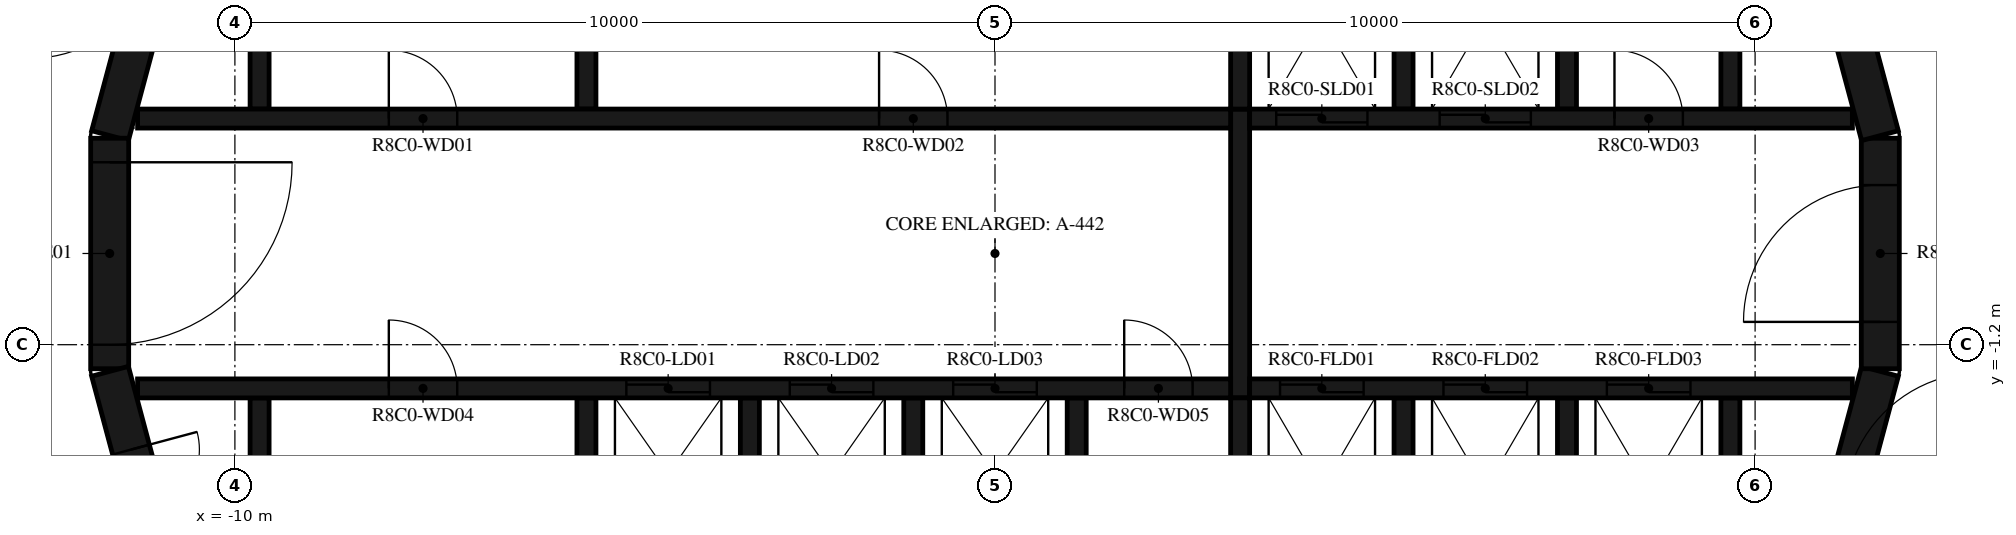
"""IFC4 building model, lengths in metres.
Left out: names, types, materials, properties, quantities, classifications, styles, units other than length and angle.
Written with IfcOpenShell. Run it as: python <this file> out.ifc"""

import sys

from ifc_helpers import new_model, si_unit, direction, frame, frame_2d, origin, place, context, subcontext, project, spatial, polyline, rectangle, outline, extrude, element, fill, save


model = new_model("IFC4")
c1 = context("Model", 3, precision=1e-05, world=origin(), true_north=direction((0.0, 1.0)))
c2 = subcontext(c1, "Body", "Model", "MODEL_VIEW")
j1 = project(units=[si_unit("LENGTHUNIT", "METRE"), si_unit("PLANEANGLEUNIT", "RADIAN")], contexts=[c1])
p1 = place(None, origin())
s1 = spatial("IfcSite", under=j1, at=p1, CompositionType="ELEMENT")
p2 = place(p1, origin())
s2 = spatial("IfcBuilding", under=s1, at=p2, CompositionType="ELEMENT")
p3 = place(p2, frame((0.0, 0.0, 319.2)))
s3 = spatial("IfcBuildingStorey", under=s2, at=p3, CompositionType="ELEMENT", Elevation=319.2)
p4 = place(p3, frame((10.858, -4.479, 0.0), z_axis=(0.0, 0.0, 1.0), x_axis=(0.258734743916, 0.965948410781, 0.0)))
e1 = element("IfcWall", 1, at=p4, inside=s3, PredefinedType="SHEAR", context=c2, shape_type="SweptSolid", body=[
    extrude(rectangle(XDim=3.033, YDim=0.5, at=frame_2d((1.516, 0.0))), origin(), (0.0, 0.0, 1.0), 3.12),
])
p5 = place(p3, frame((11.647, -1.516, 0.0), z_axis=(0.0, 0.0, 1.0), x_axis=(0.0, 1.0, 0.0)))
e2 = element("IfcWall", 2, at=p5, inside=s3, PredefinedType="SHEAR", context=c2, shape_type="SweptSolid", body=[
    extrude(rectangle(XDim=3.033, YDim=0.5, at=frame_2d((1.516, 0.0))), origin(), (0.0, 0.0, 1.0), 3.12),
])
p6 = place(p5, frame((0.616, 0.0, 0.0)))
e3 = element("IfcOpeningElement", 3, at=p6, cuts=e2, PredefinedType="OPENING", context=c2, shape_type="SweptSolid", body=[
    extrude(rectangle(XDim=1.8, YDim=2.1, at=frame_2d((0.9, 1.05))), frame((0.0, 0.26, 0.0), z_axis=(0.0, -1.0, 0.0), x_axis=(1.0, 0.0, 0.0)), (0.0, 0.0, 1.0), 0.52),
])
for number, where, z_axis, x_axis in (
    (4, (11.643, 1.55, 0.0), (0.0, 0.0, 1.0), (-0.259, 0.966, 0.0)),
    (5, (-10.858, 4.479, 0.0), (0.0, 0.0, 1.0), (-0.259, -0.966, 0.0)),
):
    element("IfcWall", number, at=place(p3, frame(where, z_axis=z_axis, x_axis=x_axis)), inside=s3, PredefinedType="SHEAR", context=c2, shape_type="SweptSolid", body=[
        extrude(rectangle(XDim=3.033, YDim=0.5, at=frame_2d((1.516, 0.0))), origin(), (0.0, 0.0, 1.0), 3.12),
    ])
p7 = place(p3, frame((-11.647, 1.516, 0.0), z_axis=(0.0, 0.0, 1.0), x_axis=(0.0, -1.0, 0.0)))
e6 = element("IfcWall", 6, at=p7, inside=s3, PredefinedType="SHEAR", context=c2, shape_type="SweptSolid", body=[
    extrude(rectangle(XDim=3.033, YDim=0.5, at=frame_2d((1.516, 0.0))), origin(), (0.0, 0.0, 1.0), 3.12),
])
p8 = place(p7, frame((0.316, 0.0, 0.0)))
e7 = element("IfcOpeningElement", 7, at=p8, cuts=e6, PredefinedType="OPENING", context=c2, shape_type="SweptSolid", body=[
    extrude(rectangle(XDim=2.4, YDim=2.1, at=frame_2d((1.2, 1.05))), frame((0.0, 0.26, 0.0), z_axis=(0.0, -1.0, 0.0), x_axis=(1.0, 0.0, 0.0)), (0.0, 0.0, 1.0), 0.52),
])
p9 = place(p3, frame((-11.643, -1.55, 0.0), z_axis=(0.0, 0.0, 1.0), x_axis=(0.258734743916, -0.965948410781, 0.0)))
e8 = element("IfcWall", 8, at=p9, inside=s3, PredefinedType="SHEAR", context=c2, shape_type="SweptSolid", body=[
    extrude(rectangle(XDim=3.033, YDim=0.5, at=frame_2d((1.516, 0.0))), origin(), (0.0, 0.0, 1.0), 3.12),
])
p10 = place(p9, frame((1.066, 0.0, 0.0)))
e9 = element("IfcOpeningElement", 9, at=p10, cuts=e8, PredefinedType="OPENING", context=c2, shape_type="SweptSolid", body=[
    extrude(rectangle(XDim=0.9, YDim=2.1, at=frame_2d((0.45, 1.05))), frame((0.0, 0.26, 0.0), z_axis=(0.0, -1.0, 0.0), x_axis=(1.0, 0.0, 0.0)), (0.0, 0.0, 1.0), 0.52),
])
p11 = place(p3, origin())
e10 = element("IfcWall", 10, at=p11, inside=s3, PredefinedType="SHEAR", context=c2, shape_type="SweptSolid", body=[
    extrude(outline(polyline([(-9.8, 1.9), (-9.55, 1.9), (-9.55, 4.8), (-5.5, 4.8), (-5.5, 1.9), (-5.25, 1.9), (-5.25, 4.8), (3.1, 4.8), (3.1, 1.9), (3.35, 1.9), (3.35, 4.8), (5.25, 4.8), (5.25, 1.9), (5.5, 1.9), (5.5, 4.8), (7.4, 4.8), (7.4, 1.9), (7.65, 1.9), (7.65, 4.8), (9.55, 4.8), (9.55, 1.9), (9.8, 1.9), (9.8, 4.8), (9.8, 5.05), (-9.8, 5.05), (-9.8, 4.8), (-9.8, 1.9)])), origin(), (0.0, 0.0, 1.0), 3.12),
])
p12 = place(p3, origin())
e11 = element("IfcWall", 11, at=p12, inside=s3, PredefinedType="SHEAR", context=c2, shape_type="SweptSolid", body=[
    extrude(outline(polyline([(9.8, -5.05), (9.8, -4.8), (9.8, -1.9), (9.55, -1.9), (9.55, -4.8), (7.65, -4.8), (7.65, -1.9), (7.4, -1.9), (7.4, -4.8), (5.5, -4.8), (5.5, -1.9), (5.25, -1.9), (5.25, -4.8), (3.35, -4.8), (3.35, -1.9), (3.1, -1.9), (3.1, -4.8), (1.2, -4.8), (1.2, -1.9), (0.95, -1.9), (0.95, -4.8), (-0.95, -4.8), (-0.95, -1.9), (-1.2, -1.9), (-1.2, -4.8), (-3.1, -4.8), (-3.1, -1.9), (-3.35, -1.9), (-3.35, -4.8), (-5.25, -4.8), (-5.25, -1.9), (-5.5, -1.9), (-5.5, -4.8), (-9.55, -4.8), (-9.55, -1.9), (-9.8, -1.9), (-9.8, -4.8), (-9.8, -5.05), (9.8, -5.05)])), origin(), (0.0, 0.0, 1.0), 3.12),
])
p13 = place(p3, frame((-11.28, 1.775, 0.0), z_axis=(0.0, 0.0, 1.0), x_axis=(1.0, 0.0, 0.0)))
e12 = element("IfcWall", 12, at=p13, inside=s3, PredefinedType="SHEAR", context=c2, shape_type="SweptSolid", body=[
    extrude(rectangle(XDim=14.38, YDim=0.25, at=frame_2d((7.19, 0.0))), origin(), (0.0, 0.0, 1.0), 3.12),
])
p14 = place(p13, frame((3.305, 0.0, 0.0)))
e13 = element("IfcOpeningElement", 13, at=p14, cuts=e12, PredefinedType="OPENING", context=c2, shape_type="SweptSolid", body=[
    extrude(rectangle(XDim=0.9, YDim=2.1, at=frame_2d((0.45, 1.05))), frame((0.0, 0.135, 0.0), z_axis=(0.0, -1.0, 0.0), x_axis=(1.0, 0.0, 0.0)), (0.0, 0.0, 1.0), 0.27),
])
p15 = place(p13, frame((9.755, 0.0, 0.0)))
e14 = element("IfcOpeningElement", 14, at=p15, cuts=e12, PredefinedType="OPENING", context=c2, shape_type="SweptSolid", body=[
    extrude(rectangle(XDim=0.9, YDim=2.1, at=frame_2d((0.45, 1.05))), frame((0.0, 0.135, 0.0), z_axis=(0.0, -1.0, 0.0), x_axis=(1.0, 0.0, 0.0)), (0.0, 0.0, 1.0), 0.27),
])
p16 = place(p3, frame((3.35, 1.775, 0.0), z_axis=(0.0, 0.0, 1.0), x_axis=(1.0, 0.0, 0.0)))
e15 = element("IfcWall", 15, at=p16, inside=s3, PredefinedType="SHEAR", context=c2, shape_type="SweptSolid", body=[
    extrude(rectangle(XDim=7.93, YDim=0.25, at=frame_2d((3.965, 0.0))), origin(), (0.0, 0.0, 1.0), 3.12),
])
p17 = place(p16, frame((0.35, 0.0, 0.0)))
e16 = element("IfcOpeningElement", 16, at=p17, cuts=e15, PredefinedType="OPENING", context=c2, shape_type="SweptSolid", body=[
    extrude(rectangle(XDim=1.2, YDim=2.4, at=frame_2d((0.6, 1.2))), frame((0.0, 0.135, 0.0), z_axis=(0.0, -1.0, 0.0), x_axis=(1.0, 0.0, 0.0)), (0.0, 0.0, 1.0), 0.27),
])
p18 = place(p16, frame((2.5, 0.0, 0.0)))
e17 = element("IfcOpeningElement", 17, at=p18, cuts=e15, PredefinedType="OPENING", context=c2, shape_type="SweptSolid", body=[
    extrude(rectangle(XDim=1.2, YDim=2.4, at=frame_2d((0.6, 1.2))), frame((0.0, 0.135, 0.0), z_axis=(0.0, -1.0, 0.0), x_axis=(1.0, 0.0, 0.0)), (0.0, 0.0, 1.0), 0.27),
])
p19 = place(p16, frame((4.8, 0.0, 0.0)))
e18 = element("IfcOpeningElement", 18, at=p19, cuts=e15, PredefinedType="OPENING", context=c2, shape_type="SweptSolid", body=[
    extrude(rectangle(XDim=0.9, YDim=2.1, at=frame_2d((0.45, 1.05))), frame((0.0, 0.135, 0.0), z_axis=(0.0, -1.0, 0.0), x_axis=(1.0, 0.0, 0.0)), (0.0, 0.0, 1.0), 0.27),
])
p20 = place(p3, frame((-11.28, -1.775, 0.0), z_axis=(0.0, 0.0, 1.0), x_axis=(1.0, 0.0, 0.0)))
e19 = element("IfcWall", 19, at=p20, inside=s3, PredefinedType="SHEAR", context=c2, shape_type="SweptSolid", body=[
    extrude(rectangle(XDim=14.38, YDim=0.25, at=frame_2d((7.19, 0.0))), origin(), (0.0, 0.0, 1.0), 3.12),
])
p21 = place(p20, frame((6.43, 0.0, 0.0)))
e20 = element("IfcOpeningElement", 20, at=p21, cuts=e19, PredefinedType="OPENING", context=c2, shape_type="SweptSolid", body=[
    extrude(rectangle(XDim=1.1, YDim=2.1, at=frame_2d((0.55, 1.05))), frame((0.0, 0.135, 0.0), z_axis=(0.0, -1.0, 0.0), x_axis=(1.0, 0.0, 0.0)), (0.0, 0.0, 1.0), 0.27),
])
p22 = place(p20, frame((8.58, 0.0, 0.0)))
e21 = element("IfcOpeningElement", 21, at=p22, cuts=e19, PredefinedType="OPENING", context=c2, shape_type="SweptSolid", body=[
    extrude(rectangle(XDim=1.1, YDim=2.1, at=frame_2d((0.55, 1.05))), frame((0.0, 0.135, 0.0), z_axis=(0.0, -1.0, 0.0), x_axis=(1.0, 0.0, 0.0)), (0.0, 0.0, 1.0), 0.27),
])
p23 = place(p20, frame((10.73, 0.0, 0.0)))
e22 = element("IfcOpeningElement", 22, at=p23, cuts=e19, PredefinedType="OPENING", context=c2, shape_type="SweptSolid", body=[
    extrude(rectangle(XDim=1.1, YDim=2.1, at=frame_2d((0.55, 1.05))), frame((0.0, 0.135, 0.0), z_axis=(0.0, -1.0, 0.0), x_axis=(1.0, 0.0, 0.0)), (0.0, 0.0, 1.0), 0.27),
])
p24 = place(p20, frame((3.305, 0.0, 0.0)))
e23 = element("IfcOpeningElement", 23, at=p24, cuts=e19, PredefinedType="OPENING", context=c2, shape_type="SweptSolid", body=[
    extrude(rectangle(XDim=0.9, YDim=2.1, at=frame_2d((0.45, 1.05))), frame((0.0, 0.135, 0.0), z_axis=(0.0, -1.0, 0.0), x_axis=(1.0, 0.0, 0.0)), (0.0, 0.0, 1.0), 0.27),
])
p25 = place(p20, frame((12.98, 0.0, 0.0)))
e24 = element("IfcOpeningElement", 24, at=p25, cuts=e19, PredefinedType="OPENING", context=c2, shape_type="SweptSolid", body=[
    extrude(rectangle(XDim=0.9, YDim=2.1, at=frame_2d((0.45, 1.05))), frame((0.0, 0.135, 0.0), z_axis=(0.0, -1.0, 0.0), x_axis=(1.0, 0.0, 0.0)), (0.0, 0.0, 1.0), 0.27),
])
p26 = place(p3, frame((3.35, -1.775, 0.0), z_axis=(0.0, 0.0, 1.0), x_axis=(1.0, 0.0, 0.0)))
e25 = element("IfcWall", 25, at=p26, inside=s3, PredefinedType="SHEAR", context=c2, shape_type="SweptSolid", body=[
    extrude(rectangle(XDim=7.93, YDim=0.25, at=frame_2d((3.965, 0.0))), origin(), (0.0, 0.0, 1.0), 3.12),
])
p27 = place(p26, frame((0.4, 0.0, 0.0)))
e26 = element("IfcOpeningElement", 26, at=p27, cuts=e25, PredefinedType="OPENING", context=c2, shape_type="SweptSolid", body=[
    extrude(rectangle(XDim=1.1, YDim=2.4, at=frame_2d((0.55, 1.2))), frame((0.0, 0.135, 0.0), z_axis=(0.0, -1.0, 0.0), x_axis=(1.0, 0.0, 0.0)), (0.0, 0.0, 1.0), 0.27),
])
p28 = place(p26, frame((2.55, 0.0, 0.0)))
e27 = element("IfcOpeningElement", 27, at=p28, cuts=e25, PredefinedType="OPENING", context=c2, shape_type="SweptSolid", body=[
    extrude(rectangle(XDim=1.1, YDim=2.4, at=frame_2d((0.55, 1.2))), frame((0.0, 0.135, 0.0), z_axis=(0.0, -1.0, 0.0), x_axis=(1.0, 0.0, 0.0)), (0.0, 0.0, 1.0), 0.27),
])
p29 = place(p26, frame((4.7, 0.0, 0.0)))
e28 = element("IfcOpeningElement", 28, at=p29, cuts=e25, PredefinedType="OPENING", context=c2, shape_type="SweptSolid", body=[
    extrude(rectangle(XDim=1.1, YDim=2.4, at=frame_2d((0.55, 1.2))), frame((0.0, 0.135, 0.0), z_axis=(0.0, -1.0, 0.0), x_axis=(1.0, 0.0, 0.0)), (0.0, 0.0, 1.0), 0.27),
])
p30 = place(p3, frame((3.225, -1.9, 0.0), z_axis=(0.0, 0.0, 1.0), x_axis=(0.0, 1.0, 0.0)))
e29 = element("IfcWall", 29, at=p30, inside=s3, PredefinedType="SHEAR", context=c2, shape_type="SweptSolid", body=[
    extrude(rectangle(XDim=3.8, YDim=0.25, at=frame_2d((1.9, 0.0))), origin(), (0.0, 0.0, 1.0), 3.12),
])
p31 = place(p3, frame((12.074, -6.831, 0.0), z_axis=(0.0, 0.0, 1.0), x_axis=(0.250391063186, 0.968144780225, 0.0)))
e30 = element("IfcWall", 30, at=p31, inside=s3, PredefinedType="STANDARD", context=c2, shape_type="SweptSolid", body=[
    extrude(rectangle(XDim=7.181, YDim=0.2, at=frame_2d((3.591, 0.0))), origin(), (0.0, 0.0, 1.0), 3.12),
])
p32 = place(p31, frame((3.581, 0.0, 0.0)))
e31 = element("IfcOpeningElement", 31, at=p32, cuts=e30, PredefinedType="OPENING", context=c2, shape_type="SweptSolid", body=[
    extrude(rectangle(XDim=1.8, YDim=2.1, at=frame_2d((0.9, 1.05))), frame((0.0, 0.11, 0.0), z_axis=(0.0, -1.0, 0.0), x_axis=(1.0, 0.0, 0.0)), (0.0, 0.0, 1.0), 0.22),
])
p33 = place(p3, frame((-12.074, 6.831, 0.0), z_axis=(0.0, 0.0, 1.0), x_axis=(-0.250391063186, -0.968144780225, 0.0)))
e32 = element("IfcWall", 32, at=p33, inside=s3, PredefinedType="STANDARD", context=c2, shape_type="SweptSolid", body=[
    extrude(rectangle(XDim=7.181, YDim=0.2, at=frame_2d((3.591, 0.0))), origin(), (0.0, 0.0, 1.0), 3.12),
])
p34 = place(p33, frame((2.548, 0.0, 0.0)))
e33 = element("IfcOpeningElement", 33, at=p34, cuts=e32, PredefinedType="OPENING", context=c2, shape_type="SweptSolid", body=[
    extrude(rectangle(XDim=1.8, YDim=2.1, at=frame_2d((0.9, 1.05))), frame((0.0, 0.11, 0.0), z_axis=(0.0, -1.0, 0.0), x_axis=(1.0, 0.0, 0.0)), (0.0, 0.0, 1.0), 0.22),
])
p35 = place(p3, frame((-13.872, -0.121, 0.0), z_axis=(0.0, 0.0, 1.0), x_axis=(0.267254575108, -0.963625960674, 0.0)))
e34 = element("IfcWall", 34, at=p35, inside=s3, PredefinedType="STANDARD", context=c2, shape_type="SweptSolid", body=[
    extrude(rectangle(XDim=7.181, YDim=0.2, at=frame_2d((3.591, 0.0))), origin(), (0.0, 0.0, 1.0), 3.12),
])
p36 = place(p8, origin())
e35 = element("IfcDoor", 35, at=p36, inside=s3, OperationType="DOUBLE_DOOR_SINGLE_SWING", PredefinedType="DOOR", context=c2, shape_type="SweptSolid", body=[
    extrude(rectangle(XDim=2.4, YDim=2.1, at=frame_2d((1.2, 1.05))), frame((0.0, 0.025, 0.0), z_axis=(0.0, -1.0, 0.0), x_axis=(1.0, 0.0, 0.0)), (0.0, 0.0, 1.0), 0.05),
])
fill(e7, e35)
p37 = place(p6, origin())
e36 = element("IfcDoor", 36, at=p37, inside=s3, OperationType="DOUBLE_DOOR_SINGLE_SWING", PredefinedType="DOOR", context=c2, shape_type="SweptSolid", body=[
    extrude(rectangle(XDim=1.8, YDim=2.1, at=frame_2d((0.9, 1.05))), frame((0.0, 0.025, 0.0), z_axis=(0.0, -1.0, 0.0), x_axis=(1.0, 0.0, 0.0)), (0.0, 0.0, 1.0), 0.05),
])
fill(e3, e36)
p38 = place(p17, origin())
e37 = element("IfcDoor", 37, at=p38, inside=s3, OperationType="DOUBLE_DOOR_SLIDING", PredefinedType="DOOR", context=c2, shape_type="SweptSolid", body=[
    extrude(rectangle(XDim=1.2, YDim=2.4, at=frame_2d((0.6, 1.2))), frame((0.0, 0.025, 0.0), z_axis=(0.0, -1.0, 0.0), x_axis=(1.0, 0.0, 0.0)), (0.0, 0.0, 1.0), 0.05),
])
fill(e16, e37)
p39 = place(p18, origin())
e38 = element("IfcDoor", 38, at=p39, inside=s3, OperationType="DOUBLE_DOOR_SLIDING", PredefinedType="DOOR", context=c2, shape_type="SweptSolid", body=[
    extrude(rectangle(XDim=1.2, YDim=2.4, at=frame_2d((0.6, 1.2))), frame((0.0, 0.025, 0.0), z_axis=(0.0, -1.0, 0.0), x_axis=(1.0, 0.0, 0.0)), (0.0, 0.0, 1.0), 0.05),
])
fill(e17, e38)
p40 = place(p21, origin())
e39 = element("IfcDoor", 39, at=p40, inside=s3, OperationType="DOUBLE_DOOR_SLIDING", PredefinedType="DOOR", context=c2, shape_type="SweptSolid", body=[
    extrude(rectangle(XDim=1.1, YDim=2.1, at=frame_2d((0.55, 1.05))), frame((0.0, 0.025, 0.0), z_axis=(0.0, -1.0, 0.0), x_axis=(1.0, 0.0, 0.0)), (0.0, 0.0, 1.0), 0.05),
])
fill(e20, e39)
p41 = place(p22, origin())
e40 = element("IfcDoor", 40, at=p41, inside=s3, OperationType="DOUBLE_DOOR_SLIDING", PredefinedType="DOOR", context=c2, shape_type="SweptSolid", body=[
    extrude(rectangle(XDim=1.1, YDim=2.1, at=frame_2d((0.55, 1.05))), frame((0.0, 0.025, 0.0), z_axis=(0.0, -1.0, 0.0), x_axis=(1.0, 0.0, 0.0)), (0.0, 0.0, 1.0), 0.05),
])
fill(e21, e40)
p42 = place(p23, origin())
e41 = element("IfcDoor", 41, at=p42, inside=s3, OperationType="DOUBLE_DOOR_SLIDING", PredefinedType="DOOR", context=c2, shape_type="SweptSolid", body=[
    extrude(rectangle(XDim=1.1, YDim=2.1, at=frame_2d((0.55, 1.05))), frame((0.0, 0.025, 0.0), z_axis=(0.0, -1.0, 0.0), x_axis=(1.0, 0.0, 0.0)), (0.0, 0.0, 1.0), 0.05),
])
fill(e22, e41)
p43 = place(p27, origin())
e42 = element("IfcDoor", 42, at=p43, inside=s3, OperationType="DOUBLE_DOOR_SLIDING", PredefinedType="DOOR", context=c2, shape_type="SweptSolid", body=[
    extrude(rectangle(XDim=1.1, YDim=2.4, at=frame_2d((0.55, 1.2))), frame((0.0, 0.025, 0.0), z_axis=(0.0, -1.0, 0.0), x_axis=(1.0, 0.0, 0.0)), (0.0, 0.0, 1.0), 0.05),
])
fill(e26, e42)
p44 = place(p28, origin())
e43 = element("IfcDoor", 43, at=p44, inside=s3, OperationType="DOUBLE_DOOR_SLIDING", PredefinedType="DOOR", context=c2, shape_type="SweptSolid", body=[
    extrude(rectangle(XDim=1.1, YDim=2.4, at=frame_2d((0.55, 1.2))), frame((0.0, 0.025, 0.0), z_axis=(0.0, -1.0, 0.0), x_axis=(1.0, 0.0, 0.0)), (0.0, 0.0, 1.0), 0.05),
])
fill(e27, e43)
p45 = place(p29, origin())
e44 = element("IfcDoor", 44, at=p45, inside=s3, OperationType="DOUBLE_DOOR_SLIDING", PredefinedType="DOOR", context=c2, shape_type="SweptSolid", body=[
    extrude(rectangle(XDim=1.1, YDim=2.4, at=frame_2d((0.55, 1.2))), frame((0.0, 0.025, 0.0), z_axis=(0.0, -1.0, 0.0), x_axis=(1.0, 0.0, 0.0)), (0.0, 0.0, 1.0), 0.05),
])
fill(e28, e44)
p46 = place(p14, origin())
e45 = element("IfcDoor", 45, at=p46, inside=s3, OperationType="SINGLE_SWING_LEFT", PredefinedType="DOOR", context=c2, shape_type="SweptSolid", body=[
    extrude(rectangle(XDim=0.9, YDim=2.1, at=frame_2d((0.45, 1.05))), frame((0.0, 0.025, 0.0), z_axis=(0.0, -1.0, 0.0), x_axis=(1.0, 0.0, 0.0)), (0.0, 0.0, 1.0), 0.05),
])
fill(e13, e45)
p47 = place(p15, origin())
e46 = element("IfcDoor", 46, at=p47, inside=s3, OperationType="SINGLE_SWING_RIGHT", PredefinedType="DOOR", context=c2, shape_type="SweptSolid", body=[
    extrude(rectangle(XDim=0.9, YDim=2.1, at=frame_2d((0.45, 1.05))), frame((0.0, 0.025, 0.0), z_axis=(0.0, -1.0, 0.0), x_axis=(1.0, 0.0, 0.0)), (0.0, 0.0, 1.0), 0.05),
])
fill(e14, e46)
p48 = place(p19, origin())
e47 = element("IfcDoor", 47, at=p48, inside=s3, OperationType="SINGLE_SWING_LEFT", PredefinedType="DOOR", context=c2, shape_type="SweptSolid", body=[
    extrude(rectangle(XDim=0.9, YDim=2.1, at=frame_2d((0.45, 1.05))), frame((0.0, 0.025, 0.0), z_axis=(0.0, -1.0, 0.0), x_axis=(1.0, 0.0, 0.0)), (0.0, 0.0, 1.0), 0.05),
])
fill(e18, e47)
p49 = place(p24, origin())
e48 = element("IfcDoor", 48, at=p49, inside=s3, OperationType="SINGLE_SWING_RIGHT", PredefinedType="DOOR", context=c2, shape_type="SweptSolid", body=[
    extrude(rectangle(XDim=0.9, YDim=2.1, at=frame_2d((0.45, 1.05))), frame((0.0, 0.025, 0.0), z_axis=(0.0, -1.0, 0.0), x_axis=(1.0, 0.0, 0.0)), (0.0, 0.0, 1.0), 0.05),
])
fill(e23, e48)
p50 = place(p25, origin())
e49 = element("IfcDoor", 49, at=p50, inside=s3, OperationType="SINGLE_SWING_LEFT", PredefinedType="DOOR", context=c2, shape_type="SweptSolid", body=[
    extrude(rectangle(XDim=0.9, YDim=2.1, at=frame_2d((0.45, 1.05))), frame((0.0, 0.025, 0.0), z_axis=(0.0, -1.0, 0.0), x_axis=(1.0, 0.0, 0.0)), (0.0, 0.0, 1.0), 0.05),
])
fill(e24, e49)
p51 = place(p10, origin())
e50 = element("IfcDoor", 50, at=p51, inside=s3, OperationType="SINGLE_SWING_RIGHT", PredefinedType="DOOR", context=c2, shape_type="SweptSolid", body=[
    extrude(rectangle(XDim=0.9, YDim=2.1, at=frame_2d((0.45, 1.05))), frame((0.0, 0.025, 0.0), z_axis=(0.0, -1.0, 0.0), x_axis=(1.0, 0.0, 0.0)), (0.0, 0.0, 1.0), 0.05),
])
fill(e9, e50)
save(model, sys.argv[1])
